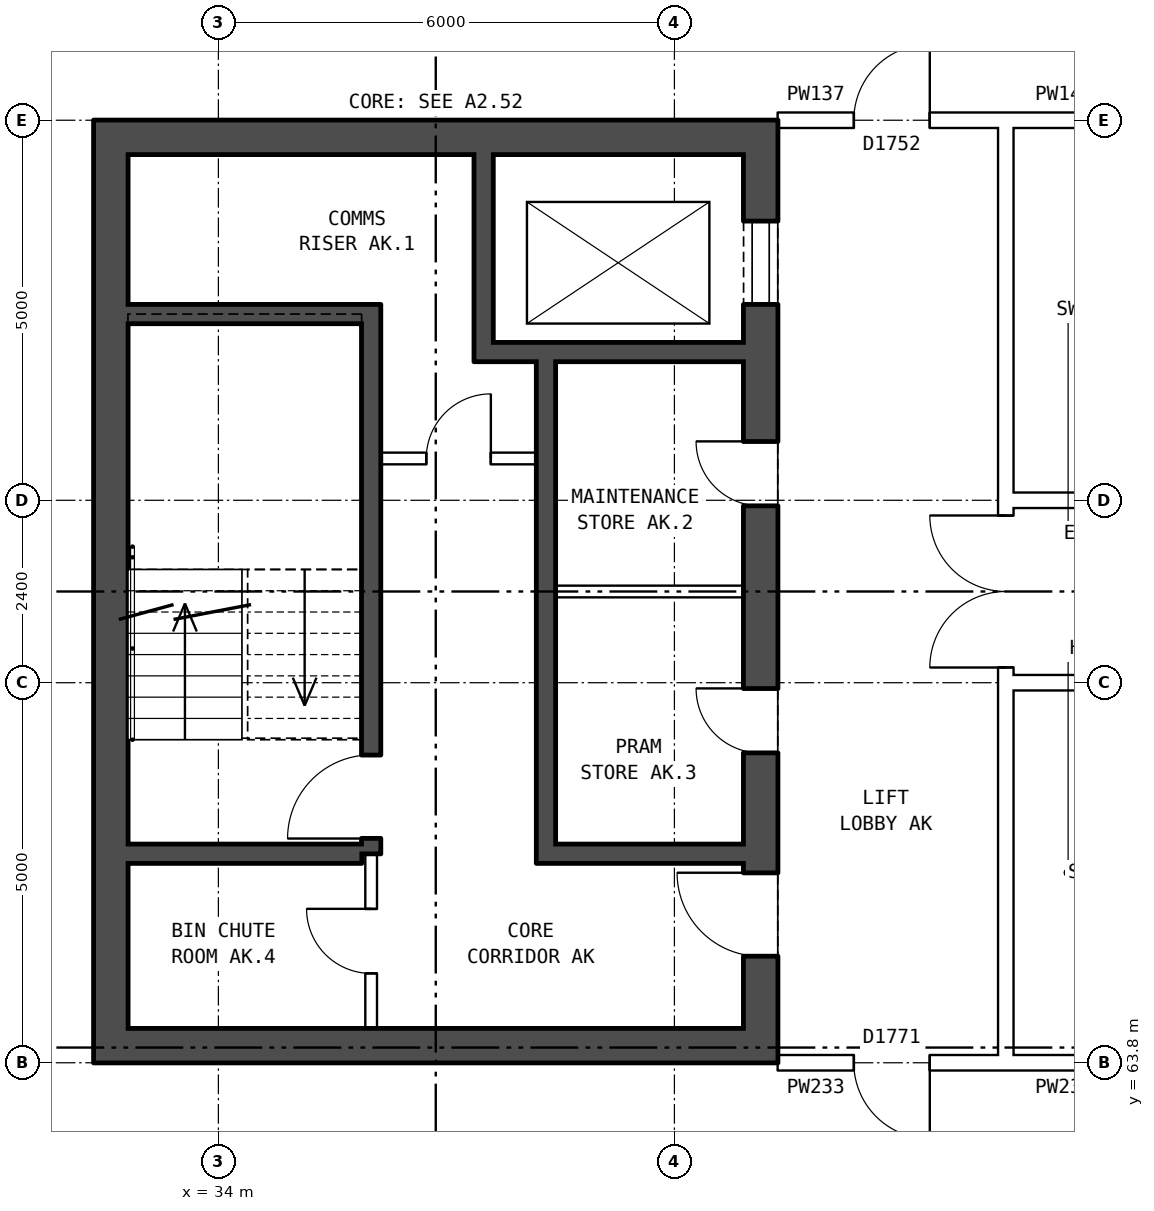
"""IFC4 building model, lengths in metres.
Left out: names, types, materials, properties, quantities, classifications, styles, units other than length and angle.
Written with IfcOpenShell. Run it as: python <this file> out.ifc"""

import sys

from ifc_helpers import new_model, si_unit, direction, frame, frame_2d, origin, place, context, subcontext, project, spatial, rectangle, extrude, element, fill, save


model = new_model("IFC4")
c1 = context("Model", 3, precision=1e-05, world=origin(), true_north=direction((0.0, 1.0)))
c2 = subcontext(c1, "Body", "Model", "MODEL_VIEW")
j1 = project(units=[si_unit("LENGTHUNIT", "METRE"), si_unit("PLANEANGLEUNIT", "RADIAN")], contexts=[c1])
p1 = place(None, origin())
s1 = spatial("IfcSite", under=j1, at=p1, CompositionType="ELEMENT")
p2 = place(p1, origin())
s2 = spatial("IfcBuilding", under=s1, at=p2, CompositionType="ELEMENT")
p3 = place(p2, frame((0.0, 0.0, 182.0)))
s3 = spatial("IfcBuildingStorey", under=s2, at=p3, CompositionType="ELEMENT", Elevation=182.0)
p4 = place(p3, frame((41.135, 76.2, 0.0), z_axis=(0.0, 0.0, 1.0), x_axis=(0.0, -1.0, 0.0)))
e1 = element("IfcWall", 1, at=p4, inside=s3, PredefinedType="SHEAR", context=c2, shape_type="SweptSolid", body=[
    extrude(rectangle(XDim=12.4, YDim=0.45, at=frame_2d((6.2, 0.0))), origin(), (0.0, 0.0, 1.0), 2.85),
])
p5 = place(p4, frame((1.325, 0.0, 0.0)))
e2 = element("IfcOpeningElement", 2, at=p5, cuts=e1, PredefinedType="OPENING", context=c2, shape_type="SweptSolid", body=[
    extrude(rectangle(XDim=1.1, YDim=2.1, at=frame_2d((0.55, 1.05))), frame((0.0, 0.235, 0.0), z_axis=(0.0, -1.0, 0.0), x_axis=(1.0, 0.0, 0.0)), (0.0, 0.0, 1.0), 0.47),
])
p6 = place(p4, frame((4.225, 0.0, 0.0)))
e3 = element("IfcOpeningElement", 3, at=p6, cuts=e1, PredefinedType="OPENING", context=c2, shape_type="SweptSolid", body=[
    extrude(rectangle(XDim=0.85, YDim=2.1, at=frame_2d((0.425, 1.05))), frame((0.0, 0.235, 0.0), z_axis=(0.0, -1.0, 0.0), x_axis=(1.0, 0.0, 0.0)), (0.0, 0.0, 1.0), 0.47),
])
p7 = place(p4, frame((7.475, 0.0, 0.0)))
e4 = element("IfcOpeningElement", 4, at=p7, cuts=e1, PredefinedType="OPENING", context=c2, shape_type="SweptSolid", body=[
    extrude(rectangle(XDim=0.85, YDim=2.1, at=frame_2d((0.425, 1.05))), frame((0.0, 0.235, 0.0), z_axis=(0.0, -1.0, 0.0), x_axis=(1.0, 0.0, 0.0)), (0.0, 0.0, 1.0), 0.47),
])
p8 = place(p4, frame((9.9, 0.0, 0.0)))
e5 = element("IfcOpeningElement", 5, at=p8, cuts=e1, PredefinedType="OPENING", context=c2, shape_type="SweptSolid", body=[
    extrude(rectangle(XDim=1.1, YDim=2.1, at=frame_2d((0.55, 1.05))), frame((0.0, 0.235, 0.0), z_axis=(0.0, -1.0, 0.0), x_axis=(1.0, 0.0, 0.0)), (0.0, 0.0, 1.0), 0.47),
])
p9 = place(p3, frame((32.585, 76.2, 0.0), z_axis=(0.0, 0.0, 1.0), x_axis=(0.0, -1.0, 0.0)))
e6 = element("IfcWall", 6, at=p9, inside=s3, PredefinedType="SHEAR", context=c2, shape_type="SweptSolid", body=[
    extrude(rectangle(XDim=12.4, YDim=0.45, at=frame_2d((6.2, 0.0))), origin(), (0.0, 0.0, 1.0), 2.85),
])
for number, where, z_axis, x_axis in (
    (7, (40.91, 75.975, 0.0), (0.0, 0.0, 1.0), (-1.0, 0.0, 0.0)),
    (8, (40.91, 64.025, 0.0), (0.0, 0.0, 1.0), (-1.0, 0.0, 0.0)),
):
    element("IfcWall", number, at=place(p3, frame(where, z_axis=z_axis, x_axis=x_axis)), inside=s3, PredefinedType="SHEAR", context=c2, shape_type="SweptSolid", body=[
        extrude(rectangle(XDim=8.1, YDim=0.45, at=frame_2d((4.05, 0.0))), origin(), (0.0, 0.0, 1.0), 2.85),
    ])
p10 = place(p3, frame((35.885, 73.65, 0.0), z_axis=(0.0, 0.0, 1.0), x_axis=(-1.0, 0.0, 0.0)))
e9 = element("IfcWall", 9, at=p10, inside=s3, PredefinedType="SHEAR", context=c2, shape_type="SweptSolid", body=[
    extrude(rectangle(XDim=3.075, YDim=0.25, at=frame_2d((1.538, 0.0))), origin(), (0.0, 0.0, 1.0), 2.85),
])
p11 = place(p3, frame((40.91, 73.15, 0.0), z_axis=(0.0, 0.0, 1.0), x_axis=(-1.0, 0.0, 0.0)))
e10 = element("IfcWall", 10, at=p11, inside=s3, PredefinedType="SHEAR", context=c2, shape_type="SweptSolid", body=[
    extrude(rectangle(XDim=3.545, YDim=0.25, at=frame_2d((1.772, 0.0))), origin(), (0.0, 0.0, 1.0), 2.85),
])
p12 = place(p3, frame((38.185, 71.75, 0.0), z_axis=(0.0, 0.0, 1.0), x_axis=(-1.0, 0.0, 0.0)))
e11 = element("IfcWall", 11, at=p12, inside=s3, PredefinedType="PARTITIONING", context=c2, shape_type="SweptSolid", body=[
    extrude(rectangle(XDim=2.05, YDim=0.15, at=frame_2d((1.025, 0.0))), origin(), (0.0, 0.0, 1.0), 2.85),
])
p13 = place(p12, frame((0.6, 0.0, 0.0)))
e12 = element("IfcOpeningElement", 12, at=p13, cuts=e11, PredefinedType="OPENING", context=c2, shape_type="SweptSolid", body=[
    extrude(rectangle(XDim=0.85, YDim=2.1, at=frame_2d((0.425, 1.05))), frame((0.0, 0.085, 0.0), z_axis=(0.0, -1.0, 0.0), x_axis=(1.0, 0.0, 0.0)), (0.0, 0.0, 1.0), 0.17),
])
p14 = place(p3, frame((40.91, 70.0, 0.0), z_axis=(0.0, 0.0, 1.0), x_axis=(-1.0, 0.0, 0.0)))
e13 = element("IfcWall", 13, at=p14, inside=s3, PredefinedType="PARTITIONING", context=c2, shape_type="SweptSolid", body=[
    extrude(rectangle(XDim=2.475, YDim=0.15, at=frame_2d((1.237, 0.0))), origin(), (0.0, 0.0, 1.0), 2.85),
])
p15 = place(p3, frame((40.91, 66.55, 0.0), z_axis=(0.0, 0.0, 1.0), x_axis=(-1.0, 0.0, 0.0)))
e14 = element("IfcWall", 14, at=p15, inside=s3, PredefinedType="SHEAR", context=c2, shape_type="SweptSolid", body=[
    extrude(rectangle(XDim=2.475, YDim=0.25, at=frame_2d((1.237, 0.0))), origin(), (0.0, 0.0, 1.0), 2.85),
])
p16 = place(p3, frame((35.885, 66.55, 0.0), z_axis=(0.0, 0.0, 1.0), x_axis=(-1.0, 0.0, 0.0)))
e15 = element("IfcWall", 15, at=p16, inside=s3, PredefinedType="SHEAR", context=c2, shape_type="SweptSolid", body=[
    extrude(rectangle(XDim=3.075, YDim=0.25, at=frame_2d((1.538, 0.0))), origin(), (0.0, 0.0, 1.0), 2.85),
])
p17 = place(p3, frame((38.31, 73.025, 0.0), z_axis=(0.0, 0.0, 1.0), x_axis=(0.0, -1.0, 0.0)))
e16 = element("IfcWall", 16, at=p17, inside=s3, PredefinedType="SHEAR", context=c2, shape_type="SweptSolid", body=[
    extrude(rectangle(XDim=6.6, YDim=0.25, at=frame_2d((3.3, 0.0))), origin(), (0.0, 0.0, 1.0), 2.85),
])
p18 = place(p3, frame((37.49, 75.75, 0.0), z_axis=(0.0, 0.0, 1.0), x_axis=(0.0, -1.0, 0.0)))
e17 = element("IfcWall", 17, at=p18, inside=s3, PredefinedType="SHEAR", context=c2, shape_type="SweptSolid", body=[
    extrude(rectangle(XDim=2.475, YDim=0.25, at=frame_2d((1.238, 0.0))), origin(), (0.0, 0.0, 1.0), 2.85),
])
p19 = place(p3, frame((36.01, 73.775, 0.0), z_axis=(0.0, 0.0, 1.0), x_axis=(0.0, -1.0, 0.0)))
e18 = element("IfcWall", 18, at=p19, inside=s3, PredefinedType="SHEAR", context=c2, shape_type="SweptSolid", body=[
    extrude(rectangle(XDim=7.225, YDim=0.25, at=frame_2d((3.612, 0.0))), origin(), (0.0, 0.0, 1.0), 2.85),
])
p20 = place(p19, frame((5.925, 0.0, 0.0)))
e19 = element("IfcOpeningElement", 19, at=p20, cuts=e18, PredefinedType="OPENING", context=c2, shape_type="SweptSolid", body=[
    extrude(rectangle(XDim=1.1, YDim=2.1, at=frame_2d((0.55, 1.05))), frame((0.0, 0.135, 0.0), z_axis=(0.0, -1.0, 0.0), x_axis=(1.0, 0.0, 0.0)), (0.0, 0.0, 1.0), 0.27),
])
p21 = place(p3, frame((36.01, 66.55, 0.0), z_axis=(0.0, 0.0, 1.0), x_axis=(0.0, -1.0, 0.0)))
e20 = element("IfcWall", 20, at=p21, inside=s3, PredefinedType="PARTITIONING", context=c2, shape_type="SweptSolid", body=[
    extrude(rectangle(XDim=2.3, YDim=0.15, at=frame_2d((1.15, 0.0))), origin(), (0.0, 0.0, 1.0), 2.85),
])
p22 = place(p21, frame((0.725, 0.0, 0.0)))
e21 = element("IfcOpeningElement", 21, at=p22, cuts=e20, PredefinedType="OPENING", context=c2, shape_type="SweptSolid", body=[
    extrude(rectangle(XDim=0.85, YDim=2.1, at=frame_2d((0.425, 1.05))), frame((0.0, 0.085, 0.0), z_axis=(0.0, -1.0, 0.0), x_axis=(1.0, 0.0, 0.0)), (0.0, 0.0, 1.0), 0.17),
])
p23 = place(p3, frame((44.36, 63.9, 0.0), z_axis=(0.0, 0.0, 1.0), x_axis=(0.0, 1.0, 0.0)))
e22 = element("IfcWall", 22, at=p23, inside=s3, PredefinedType="PARTITIONING", context=c2, shape_type="SweptSolid", body=[
    extrude(rectangle(XDim=12.2, YDim=0.2, at=frame_2d((6.1, 0.0))), origin(), (0.0, 0.0, 1.0), 2.85),
])
p24 = place(p23, frame((5.1, 0.0, 0.0)))
e23 = element("IfcOpeningElement", 23, at=p24, cuts=e22, PredefinedType="OPENING", context=c2, shape_type="SweptSolid", body=[
    extrude(rectangle(XDim=2.0, YDim=2.1, at=frame_2d((1.0, 1.05))), frame((0.0, 0.11, 0.0), z_axis=(0.0, -1.0, 0.0), x_axis=(1.0, 0.0, 0.0)), (0.0, 0.0, 1.0), 0.22),
])
p25 = place(p3, frame((41.36, 63.8, 0.0), z_axis=(0.0, 0.0, 1.0), x_axis=(1.0, 0.0, 0.0)))
e24 = element("IfcWall", 24, at=p25, inside=s3, PredefinedType="PARTITIONING", context=c2, shape_type="SweptSolid", body=[
    extrude(rectangle(XDim=3.0, YDim=0.2, at=frame_2d((1.5, 0.0))), origin(), (0.0, 0.0, 1.0), 2.85),
])
p26 = place(p25, frame((1.0, 0.0, 0.0)))
e25 = element("IfcOpeningElement", 25, at=p26, cuts=e24, PredefinedType="OPENING", context=c2, shape_type="SweptSolid", body=[
    extrude(rectangle(XDim=1.0, YDim=2.1, at=frame_2d((0.5, 1.05))), frame((0.0, 0.11, 0.0), z_axis=(0.0, -1.0, 0.0), x_axis=(1.0, 0.0, 0.0)), (0.0, 0.0, 1.0), 0.22),
])
p27 = place(p3, frame((44.36, 63.8, 0.0), z_axis=(0.0, 0.0, 1.0), x_axis=(1.0, 0.0, 0.0)))
e26 = element("IfcWall", 26, at=p27, inside=s3, PredefinedType="PARTITIONING", context=c2, shape_type="SweptSolid", body=[
    extrude(rectangle(XDim=1.54, YDim=0.2, at=frame_2d((0.77, 0.0))), origin(), (0.0, 0.0, 1.0), 2.85),
])
p28 = place(p3, frame((44.36, 68.8, 0.0), z_axis=(0.0, 0.0, 1.0), x_axis=(1.0, 0.0, 0.0)))
e27 = element("IfcWall", 27, at=p28, inside=s3, PredefinedType="PARTITIONING", context=c2, shape_type="SweptSolid", body=[
    extrude(rectangle(XDim=19.28, YDim=0.2, at=frame_2d((9.64, 0.0))), origin(), (0.0, 0.0, 1.0), 2.85),
])
p29 = place(p28, frame((14.64, 0.0, 0.0)))
e28 = element("IfcOpeningElement", 28, at=p29, cuts=e27, PredefinedType="OPENING", context=c2, shape_type="SweptSolid", body=[
    extrude(rectangle(XDim=1.0, YDim=2.1, at=frame_2d((0.5, 1.05))), frame((0.0, 0.11, 0.0), z_axis=(0.0, -1.0, 0.0), x_axis=(1.0, 0.0, 0.0)), (0.0, 0.0, 1.0), 0.22),
])
p30 = place(p28, frame((11.64, 0.0, 0.0)))
e29 = element("IfcOpeningElement", 29, at=p30, cuts=e27, PredefinedType="OPENING", context=c2, shape_type="SweptSolid", body=[
    extrude(rectangle(XDim=1.0, YDim=2.1, at=frame_2d((0.5, 1.05))), frame((0.0, 0.11, 0.0), z_axis=(0.0, -1.0, 0.0), x_axis=(1.0, 0.0, 0.0)), (0.0, 0.0, 1.0), 0.22),
])
p31 = place(p28, frame((5.64, 0.0, 0.0)))
e30 = element("IfcOpeningElement", 30, at=p31, cuts=e27, PredefinedType="OPENING", context=c2, shape_type="SweptSolid", body=[
    extrude(rectangle(XDim=1.0, YDim=2.1, at=frame_2d((0.5, 1.05))), frame((0.0, 0.11, 0.0), z_axis=(0.0, -1.0, 0.0), x_axis=(1.0, 0.0, 0.0)), (0.0, 0.0, 1.0), 0.22),
])
p32 = place(p3, frame((44.36, 71.2, 0.0), z_axis=(0.0, 0.0, 1.0), x_axis=(1.0, 0.0, 0.0)))
e31 = element("IfcWall", 31, at=p32, inside=s3, PredefinedType="PARTITIONING", context=c2, shape_type="SweptSolid", body=[
    extrude(rectangle(XDim=19.28, YDim=0.2, at=frame_2d((9.64, 0.0))), origin(), (0.0, 0.0, 1.0), 2.85),
])
p33 = place(p32, frame((14.64, 0.0, 0.0)))
e32 = element("IfcOpeningElement", 32, at=p33, cuts=e31, PredefinedType="OPENING", context=c2, shape_type="SweptSolid", body=[
    extrude(rectangle(XDim=1.0, YDim=2.1, at=frame_2d((0.5, 1.05))), frame((0.0, 0.11, 0.0), z_axis=(0.0, -1.0, 0.0), x_axis=(1.0, 0.0, 0.0)), (0.0, 0.0, 1.0), 0.22),
])
p34 = place(p32, frame((5.64, 0.0, 0.0)))
e33 = element("IfcOpeningElement", 33, at=p34, cuts=e31, PredefinedType="OPENING", context=c2, shape_type="SweptSolid", body=[
    extrude(rectangle(XDim=1.0, YDim=2.1, at=frame_2d((0.5, 1.05))), frame((0.0, 0.11, 0.0), z_axis=(0.0, -1.0, 0.0), x_axis=(1.0, 0.0, 0.0)), (0.0, 0.0, 1.0), 0.22),
])
p35 = place(p3, frame((41.36, 76.2, 0.0), z_axis=(0.0, 0.0, 1.0), x_axis=(1.0, 0.0, 0.0)))
e34 = element("IfcWall", 34, at=p35, inside=s3, PredefinedType="PARTITIONING", context=c2, shape_type="SweptSolid", body=[
    extrude(rectangle(XDim=3.0, YDim=0.2, at=frame_2d((1.5, 0.0))), origin(), (0.0, 0.0, 1.0), 2.85),
])
p36 = place(p35, frame((1.0, 0.0, 0.0)))
e35 = element("IfcOpeningElement", 35, at=p36, cuts=e34, PredefinedType="OPENING", context=c2, shape_type="SweptSolid", body=[
    extrude(rectangle(XDim=1.0, YDim=2.1, at=frame_2d((0.5, 1.05))), frame((0.0, 0.11, 0.0), z_axis=(0.0, -1.0, 0.0), x_axis=(1.0, 0.0, 0.0)), (0.0, 0.0, 1.0), 0.22),
])
p37 = place(p3, frame((44.36, 76.2, 0.0), z_axis=(0.0, 0.0, 1.0), x_axis=(1.0, 0.0, 0.0)))
e36 = element("IfcWall", 36, at=p37, inside=s3, PredefinedType="PARTITIONING", context=c2, shape_type="SweptSolid", body=[
    extrude(rectangle(XDim=1.54, YDim=0.2, at=frame_2d((0.77, 0.0))), origin(), (0.0, 0.0, 1.0), 2.85),
])
p38 = place(p5, origin())
e37 = element("IfcDoor", 37, at=p38, inside=s3, OperationType="DOUBLE_DOOR_SLIDING", PredefinedType="DOOR", context=c2, shape_type="SweptSolid", body=[
    extrude(rectangle(XDim=1.1, YDim=2.1, at=frame_2d((0.55, 1.05))), frame((0.0, -0.16, 0.0), z_axis=(0.0, -1.0, 0.0), x_axis=(1.0, 0.0, 0.0)), (0.0, 0.0, 1.0), 0.05),
])
fill(e2, e37)
p39 = place(p6, frame((0.85, 0.0, 0.0), z_axis=(0.0, 0.0, 1.0), x_axis=(-1.0, 0.0, 0.0)))
e38 = element("IfcDoor", 38, at=p39, inside=s3, OperationType="SINGLE_SWING_RIGHT", PredefinedType="DOOR", context=c2, shape_type="SweptSolid", body=[
    extrude(rectangle(XDim=0.85, YDim=2.1, at=frame_2d((0.425, 1.05))), frame((0.0, 0.21, 0.0), z_axis=(0.0, -1.0, 0.0), x_axis=(1.0, 0.0, 0.0)), (0.0, 0.0, 1.0), 0.05),
])
fill(e3, e38)
p40 = place(p7, frame((0.85, 0.0, 0.0), z_axis=(0.0, 0.0, 1.0), x_axis=(-1.0, 0.0, 0.0)))
e39 = element("IfcDoor", 39, at=p40, inside=s3, OperationType="SINGLE_SWING_RIGHT", PredefinedType="DOOR", context=c2, shape_type="SweptSolid", body=[
    extrude(rectangle(XDim=0.85, YDim=2.1, at=frame_2d((0.425, 1.05))), frame((0.0, 0.21, 0.0), z_axis=(0.0, -1.0, 0.0), x_axis=(1.0, 0.0, 0.0)), (0.0, 0.0, 1.0), 0.05),
])
fill(e4, e39)
p41 = place(p8, frame((1.1, 0.0, 0.0), z_axis=(0.0, 0.0, 1.0), x_axis=(-1.0, 0.0, 0.0)))
e40 = element("IfcDoor", 40, at=p41, inside=s3, OperationType="SINGLE_SWING_RIGHT", PredefinedType="DOOR", context=c2, shape_type="SweptSolid", body=[
    extrude(rectangle(XDim=1.1, YDim=2.1, at=frame_2d((0.55, 1.05))), frame((0.0, 0.21, 0.0), z_axis=(0.0, -1.0, 0.0), x_axis=(1.0, 0.0, 0.0)), (0.0, 0.0, 1.0), 0.05),
])
fill(e5, e40)
p42 = place(p20, frame((1.1, 0.0, 0.0), z_axis=(0.0, 0.0, 1.0), x_axis=(-1.0, 0.0, 0.0)))
e41 = element("IfcDoor", 41, at=p42, inside=s3, OperationType="SINGLE_SWING_LEFT", PredefinedType="DOOR", context=c2, shape_type="SweptSolid", body=[
    extrude(rectangle(XDim=1.1, YDim=2.1, at=frame_2d((0.55, 1.05))), frame((0.0, 0.025, 0.0), z_axis=(0.0, -1.0, 0.0), x_axis=(1.0, 0.0, 0.0)), (0.0, 0.0, 1.0), 0.05),
])
fill(e19, e41)
p43 = place(p13, frame((0.85, 0.0, 0.0), z_axis=(0.0, 0.0, 1.0), x_axis=(-1.0, 0.0, 0.0)))
e42 = element("IfcDoor", 42, at=p43, inside=s3, OperationType="SINGLE_SWING_RIGHT", PredefinedType="DOOR", context=c2, shape_type="SweptSolid", body=[
    extrude(rectangle(XDim=0.85, YDim=2.1, at=frame_2d((0.425, 1.05))), frame((0.0, 0.025, 0.0), z_axis=(0.0, -1.0, 0.0), x_axis=(1.0, 0.0, 0.0)), (0.0, 0.0, 1.0), 0.05),
])
fill(e12, e42)
p44 = place(p22, frame((0.85, 0.0, 0.0), z_axis=(0.0, 0.0, 1.0), x_axis=(-1.0, 0.0, 0.0)))
e43 = element("IfcDoor", 43, at=p44, inside=s3, OperationType="SINGLE_SWING_RIGHT", PredefinedType="DOOR", context=c2, shape_type="SweptSolid", body=[
    extrude(rectangle(XDim=0.85, YDim=2.1, at=frame_2d((0.425, 1.05))), frame((0.0, 0.025, 0.0), z_axis=(0.0, -1.0, 0.0), x_axis=(1.0, 0.0, 0.0)), (0.0, 0.0, 1.0), 0.05),
])
fill(e21, e43)
p45 = place(p24, origin())
e44 = element("IfcDoor", 44, at=p45, inside=s3, OperationType="DOUBLE_DOOR_SINGLE_SWING", PredefinedType="DOOR", context=c2, shape_type="SweptSolid", body=[
    extrude(rectangle(XDim=2.0, YDim=2.1, at=frame_2d((1.0, 1.05))), frame((0.0, 0.025, 0.0), z_axis=(0.0, -1.0, 0.0), x_axis=(1.0, 0.0, 0.0)), (0.0, 0.0, 1.0), 0.05),
])
fill(e23, e44)
p46 = place(p26, frame((1.0, 0.0, 0.0), z_axis=(0.0, 0.0, 1.0), x_axis=(-1.0, 0.0, 0.0)))
e45 = element("IfcDoor", 45, at=p46, inside=s3, OperationType="SINGLE_SWING_LEFT", PredefinedType="DOOR", context=c2, shape_type="SweptSolid", body=[
    extrude(rectangle(XDim=1.0, YDim=2.1, at=frame_2d((0.5, 1.05))), frame((0.0, 0.025, 0.0), z_axis=(0.0, -1.0, 0.0), x_axis=(1.0, 0.0, 0.0)), (0.0, 0.0, 1.0), 0.05),
])
fill(e25, e45)
p47 = place(p36, origin())
e46 = element("IfcDoor", 46, at=p47, inside=s3, OperationType="SINGLE_SWING_RIGHT", PredefinedType="DOOR", context=c2, shape_type="SweptSolid", body=[
    extrude(rectangle(XDim=1.0, YDim=2.1, at=frame_2d((0.5, 1.05))), frame((0.0, 0.025, 0.0), z_axis=(0.0, -1.0, 0.0), x_axis=(1.0, 0.0, 0.0)), (0.0, 0.0, 1.0), 0.05),
])
fill(e35, e46)
save(model, sys.argv[1])
